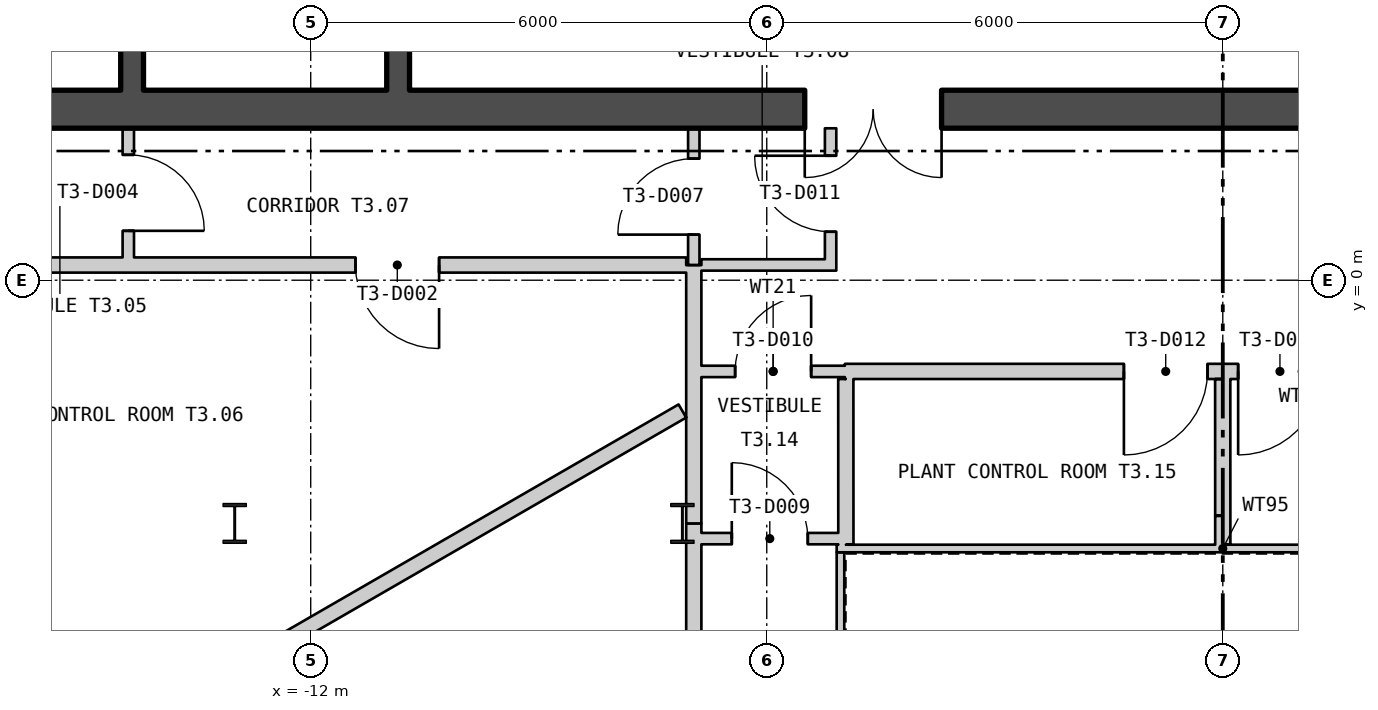
"""IFC4 building model, lengths in metres.
Left out: names, types, materials, properties, quantities, classifications, styles, units other than length and angle.
Written with IfcOpenShell. Run it as: python <this file> out.ifc"""

import sys

from ifc_helpers import new_model, si_unit, direction, frame, frame_2d, origin, origin_2d, place, context, subcontext, project, spatial, polyline, rectangle, i_section, outline, extrude, element, fill, save


model = new_model("IFC4")
c1 = context("Model", 3, precision=1e-05, world=origin(), true_north=direction((0.0, 1.0)))
c2 = subcontext(c1, "Body", "Model", "MODEL_VIEW")
j1 = project(units=[si_unit("LENGTHUNIT", "METRE"), si_unit("PLANEANGLEUNIT", "RADIAN")], contexts=[c1])
p1 = place(None, origin())
s1 = spatial("IfcSite", under=j1, at=p1, CompositionType="ELEMENT")
p2 = place(p1, origin())
s2 = spatial("IfcBuilding", under=s1, at=p2, CompositionType="ELEMENT")
p3 = place(p2, frame((0.0, 0.0, 186.6)))
s3 = spatial("IfcBuildingStorey", under=s2, at=p3, CompositionType="ELEMENT", Elevation=186.6)
for number, where, z_axis, x_axis in (
    (1, (-7.11, -3.2, 0.0), (0.0, 0.0, 1.0), (1.0, 0.0, 0.0)),
    (2, (-13.0, -3.2, 0.0), (0.0, 0.0, 1.0), (1.0, 0.0, 0.0)),
):
    element("IfcColumn", number, at=place(p3, frame(where, z_axis=z_axis, x_axis=x_axis)), inside=s3, PredefinedType="COLUMN", context=c2, shape_type="SweptSolid", body=[
        extrude(i_section(OverallWidth=0.306, OverallDepth=0.524, WebThickness=0.021, FlangeThickness=0.04, at=origin_2d()), origin(), (0.0, 0.0, 1.0), 6.0),
    ])
p4 = place(p3, frame((-26.67, 13.393, -0.18), z_axis=(0.0, 0.0, 1.0), x_axis=(0.500000711659, -0.866024992908, 0.0)))
e3 = element("IfcWall", 3, at=p4, inside=s3, PredefinedType="SOLIDWALL", context=c2, shape_type="SweptSolid", body=[
    extrude(outline(polyline([(-0.13, -0.225), (45.87, -0.225), (45.61, 0.225), (0.13, 0.225), (-0.13, -0.225)])), origin(), (0.0, 0.0, 1.0), 6.0),
])
p5 = place(p4, frame((1.424, 0.0, 1.38)))
e4 = element("IfcOpeningElement", 4, at=p5, cuts=e3, PredefinedType="OPENING", context=c2, shape_type="SweptSolid", body=[
    extrude(rectangle(XDim=2.4, YDim=3.6, at=frame_2d((1.2, 1.8))), frame((0.0, 0.235, 0.0), z_axis=(0.0, -1.0, 0.0), x_axis=(1.0, 0.0, 0.0)), (0.0, 0.0, 1.0), 0.47),
])
p6 = place(p4, frame((5.893, 0.0, 1.38)))
e5 = element("IfcOpeningElement", 5, at=p6, cuts=e3, PredefinedType="OPENING", context=c2, shape_type="SweptSolid", body=[
    extrude(rectangle(XDim=2.4, YDim=3.6, at=frame_2d((1.2, 1.8))), frame((0.0, 0.235, 0.0), z_axis=(0.0, -1.0, 0.0), x_axis=(1.0, 0.0, 0.0)), (0.0, 0.0, 1.0), 0.47),
])
p7 = place(p4, frame((10.401, 0.0, 1.38)))
e6 = element("IfcOpeningElement", 6, at=p7, cuts=e3, PredefinedType="OPENING", context=c2, shape_type="SweptSolid", body=[
    extrude(rectangle(XDim=2.4, YDim=3.6, at=frame_2d((1.2, 1.8))), frame((0.0, 0.235, 0.0), z_axis=(0.0, -1.0, 0.0), x_axis=(1.0, 0.0, 0.0)), (0.0, 0.0, 1.0), 0.47),
])
p8 = place(p4, frame((14.909, 0.0, 1.38)))
e7 = element("IfcOpeningElement", 7, at=p8, cuts=e3, PredefinedType="OPENING", context=c2, shape_type="SweptSolid", body=[
    extrude(rectangle(XDim=2.4, YDim=3.6, at=frame_2d((1.2, 1.8))), frame((0.0, 0.235, 0.0), z_axis=(0.0, -1.0, 0.0), x_axis=(1.0, 0.0, 0.0)), (0.0, 0.0, 1.0), 0.47),
])
p9 = place(p4, frame((19.416, 0.0, 1.38)))
e8 = element("IfcOpeningElement", 8, at=p9, cuts=e3, PredefinedType="OPENING", context=c2, shape_type="SweptSolid", body=[
    extrude(rectangle(XDim=2.4, YDim=3.6, at=frame_2d((1.2, 1.8))), frame((0.0, 0.235, 0.0), z_axis=(0.0, -1.0, 0.0), x_axis=(1.0, 0.0, 0.0)), (0.0, 0.0, 1.0), 0.47),
])
p10 = place(p4, frame((23.924, 0.0, 1.38)))
e9 = element("IfcOpeningElement", 9, at=p10, cuts=e3, PredefinedType="OPENING", context=c2, shape_type="SweptSolid", body=[
    extrude(rectangle(XDim=2.4, YDim=3.6, at=frame_2d((1.2, 1.8))), frame((0.0, 0.235, 0.0), z_axis=(0.0, -1.0, 0.0), x_axis=(1.0, 0.0, 0.0)), (0.0, 0.0, 1.0), 0.47),
])
p11 = place(p4, frame((28.431, 0.0, 1.38)))
e10 = element("IfcOpeningElement", 10, at=p11, cuts=e3, PredefinedType="OPENING", context=c2, shape_type="SweptSolid", body=[
    extrude(rectangle(XDim=2.4, YDim=3.6, at=frame_2d((1.2, 1.8))), frame((0.0, 0.235, 0.0), z_axis=(0.0, -1.0, 0.0), x_axis=(1.0, 0.0, 0.0)), (0.0, 0.0, 1.0), 0.47),
])
p12 = place(p4, frame((32.939, 0.0, 1.38)))
e11 = element("IfcOpeningElement", 11, at=p12, cuts=e3, PredefinedType="OPENING", context=c2, shape_type="SweptSolid", body=[
    extrude(rectangle(XDim=2.4, YDim=3.6, at=frame_2d((1.2, 1.8))), frame((0.0, 0.235, 0.0), z_axis=(0.0, -1.0, 0.0), x_axis=(1.0, 0.0, 0.0)), (0.0, 0.0, 1.0), 0.47),
])
p13 = place(p4, frame((37.447, 0.0, 1.38)))
e12 = element("IfcOpeningElement", 12, at=p13, cuts=e3, PredefinedType="OPENING", context=c2, shape_type="SweptSolid", body=[
    extrude(rectangle(XDim=2.4, YDim=3.6, at=frame_2d((1.2, 1.8))), frame((0.0, 0.235, 0.0), z_axis=(0.0, -1.0, 0.0), x_axis=(1.0, 0.0, 0.0)), (0.0, 0.0, 1.0), 0.47),
])
p14 = place(p4, frame((41.916, 0.0, 1.38)))
e13 = element("IfcOpeningElement", 13, at=p14, cuts=e3, PredefinedType="OPENING", context=c2, shape_type="SweptSolid", body=[
    extrude(rectangle(XDim=2.4, YDim=3.6, at=frame_2d((1.2, 1.8))), frame((0.0, 0.235, 0.0), z_axis=(0.0, -1.0, 0.0), x_axis=(1.0, 0.0, 0.0)), (0.0, 0.0, 1.0), 0.47),
])
p15 = place(p3, frame((5.08, -3.53, 0.0), z_axis=(0.0, 0.0, 1.0), x_axis=(-1.0, 0.0, 0.0)))
e14 = element("IfcWall", 14, at=p15, inside=s3, PredefinedType="PARTITIONING", context=c2, shape_type="SweptSolid", body=[
    extrude(rectangle(XDim=10.16, YDim=0.1, at=frame_2d((5.08, 0.0))), origin(), (0.0, 0.0, 1.0), 5.8),
])
p16 = place(p3, frame((-5.03, -3.58, 0.0), z_axis=(0.0, 0.0, 1.0), x_axis=(0.0, -1.0, 0.0)))
e15 = element("IfcWall", 15, at=p16, inside=s3, PredefinedType="PARTITIONING", context=c2, shape_type="SweptSolid", body=[
    extrude(rectangle(XDim=8.04, YDim=0.1, at=frame_2d((4.02, 0.0))), origin(), (0.0, 0.0, 1.0), 5.8),
])
p17 = place(p3, frame((-16.2, 2.25, 0.0), z_axis=(0.0, 0.0, 1.0), x_axis=(1.0, 0.0, 0.0)))
e16 = element("IfcWall", 16, at=p17, inside=s3, PredefinedType="SHEAR", context=c2, shape_type="SweptSolid", body=[
    extrude(rectangle(XDim=32.4, YDim=0.5, at=frame_2d((16.2, 0.0))), origin(), (0.0, 0.0, 1.0), 5.8),
])
p18 = place(p17, frame((10.7, 0.0, 0.0)))
e17 = element("IfcOpeningElement", 17, at=p18, cuts=e16, PredefinedType="OPENING", context=c2, shape_type="SweptSolid", body=[
    extrude(rectangle(XDim=1.8, YDim=2.4, at=frame_2d((0.9, 1.2))), frame((0.0, 0.26, 0.0), z_axis=(0.0, -1.0, 0.0), x_axis=(1.0, 0.0, 0.0)), (0.0, 0.0, 1.0), 0.52),
])
p19 = place(p17, frame((20.7, 0.0, 0.0)))
e18 = element("IfcOpeningElement", 18, at=p19, cuts=e16, PredefinedType="OPENING", context=c2, shape_type="SweptSolid", body=[
    extrude(rectangle(XDim=1.8, YDim=2.4, at=frame_2d((0.9, 1.2))), frame((0.0, 0.26, 0.0), z_axis=(0.0, -1.0, 0.0), x_axis=(1.0, 0.0, 0.0)), (0.0, 0.0, 1.0), 0.52),
])
p20 = place(p3, frame((-10.85, 2.5, 0.0), z_axis=(0.0, 0.0, 1.0), x_axis=(0.0, 1.0, 0.0)))
e19 = element("IfcWall", 19, at=p20, inside=s3, PredefinedType="SHEAR", context=c2, shape_type="SweptSolid", body=[
    extrude(rectangle(XDim=15.0, YDim=0.3, at=frame_2d((7.5, 0.0))), origin(), (0.0, 0.0, 1.0), 5.8),
])
p21 = place(p20, frame((3.475, 0.0, 0.0)))
e20 = element("IfcOpeningElement", 20, at=p21, cuts=e19, PredefinedType="OPENING", context=c2, shape_type="SweptSolid", body=[
    extrude(rectangle(XDim=1.25, YDim=2.1, at=frame_2d((0.625, 1.05))), frame((0.0, 0.16, 0.0), z_axis=(0.0, -1.0, 0.0), x_axis=(1.0, 0.0, 0.0)), (0.0, 0.0, 1.0), 0.32),
])
p22 = place(p20, frame((1.125, 0.0, 0.0)))
e21 = element("IfcOpeningElement", 21, at=p22, cuts=e19, PredefinedType="OPENING", context=c2, shape_type="SweptSolid", body=[
    extrude(rectangle(XDim=1.0, YDim=2.1, at=frame_2d((0.5, 1.05))), frame((0.0, 0.16, 0.0), z_axis=(0.0, -1.0, 0.0), x_axis=(1.0, 0.0, 0.0)), (0.0, 0.0, 1.0), 0.32),
])
p23 = place(p3, frame((-14.35, 2.5, 0.0), z_axis=(0.0, 0.0, 1.0), x_axis=(0.0, 1.0, 0.0)))
e22 = element("IfcWall", 22, at=p23, inside=s3, PredefinedType="SHEAR", context=c2, shape_type="SweptSolid", body=[
    extrude(rectangle(XDim=15.0, YDim=0.3, at=frame_2d((7.5, 0.0))), origin(), (0.0, 0.0, 1.0), 5.8),
])
p24 = place(p23, frame((4.35, 0.0, 0.0)))
e23 = element("IfcOpeningElement", 23, at=p24, cuts=e22, PredefinedType="OPENING", context=c2, shape_type="SweptSolid", body=[
    extrude(rectangle(XDim=1.5, YDim=2.1, at=frame_2d((0.75, 1.05))), frame((0.0, 0.16, 0.0), z_axis=(0.0, -1.0, 0.0), x_axis=(1.0, 0.0, 0.0)), (0.0, 0.0, 1.0), 0.32),
])
p25 = place(p3, frame((-17.9, 0.2, 0.0), z_axis=(0.0, 0.0, 1.0), x_axis=(1.0, 0.0, 0.0)))
e24 = element("IfcWall", 24, at=p25, inside=s3, PredefinedType="PARTITIONING", context=c2, shape_type="SweptSolid", body=[
    extrude(rectangle(XDim=10.84, YDim=0.2, at=frame_2d((5.42, 0.0))), origin(), (0.0, 0.0, 1.0), 5.8),
])
p26 = place(p25, frame((6.489, 0.0, 0.0)))
e25 = element("IfcOpeningElement", 25, at=p26, cuts=e24, PredefinedType="OPENING", context=c2, shape_type="SweptSolid", body=[
    extrude(rectangle(XDim=1.1, YDim=2.1, at=frame_2d((0.55, 1.05))), frame((0.0, 0.11, 0.0), z_axis=(0.0, -1.0, 0.0), x_axis=(1.0, 0.0, 0.0)), (0.0, 0.0, 1.0), 0.22),
])
p27 = place(p3, frame((-14.651, -6.075, 0.0), z_axis=(0.0, 0.0, 1.0), x_axis=(0.866015377534, 0.500017365573, 0.0)))
e26 = element("IfcWall", 26, at=p27, inside=s3, PredefinedType="PARTITIONING", context=c2, shape_type="SweptSolid", body=[
    extrude(rectangle(XDim=8.708, YDim=0.2, at=frame_2d((4.354, 0.0))), origin(), (0.0, 0.0, 1.0), 5.8),
])
p28 = place(p3, frame((-14.4, 0.3, 0.0), z_axis=(0.0, 0.0, 1.0), x_axis=(0.0, 1.0, 0.0)))
e27 = element("IfcWall", 27, at=p28, inside=s3, PredefinedType="PARTITIONING", context=c2, shape_type="SweptSolid", body=[
    extrude(rectangle(XDim=1.7, YDim=0.15, at=frame_2d((0.85, 0.0))), origin(), (0.0, 0.0, 1.0), 5.8),
])
p29 = place(p28, frame((0.35, 0.0, 0.0)))
e28 = element("IfcOpeningElement", 28, at=p29, cuts=e27, PredefinedType="OPENING", context=c2, shape_type="SweptSolid", body=[
    extrude(rectangle(XDim=1.0, YDim=2.1, at=frame_2d((0.5, 1.05))), frame((0.0, 0.085, 0.0), z_axis=(0.0, -1.0, 0.0), x_axis=(1.0, 0.0, 0.0)), (0.0, 0.0, 1.0), 0.17),
])
p30 = place(p3, frame((-6.96, -13.699, 0.0), z_axis=(0.0, 0.0, 1.0), x_axis=(0.0, 1.0, 0.0)))
e29 = element("IfcWall", 29, at=p30, inside=s3, PredefinedType="PARTITIONING", context=c2, shape_type="SweptSolid", body=[
    extrude(rectangle(XDim=10.499, YDim=0.2, at=frame_2d((5.25, 0.0))), origin(), (0.0, 0.0, 1.0), 5.21),
])
p31 = place(p30, frame((3.656, 0.0, 0.0)))
e30 = element("IfcOpeningElement", 30, at=p31, cuts=e29, PredefinedType="OPENING", context=c2, shape_type="SweptSolid", body=[
    extrude(rectangle(XDim=1.1, YDim=2.1, at=frame_2d((0.55, 1.05))), frame((0.0, 0.11, 0.0), z_axis=(0.0, -1.0, 0.0), x_axis=(1.0, 0.0, 0.0)), (0.0, 0.0, 1.0), 0.22),
])
p32 = place(p30, frame((7.059, 0.0, 0.0)))
e31 = element("IfcOpeningElement", 31, at=p32, cuts=e29, PredefinedType="OPENING", context=c2, shape_type="SweptSolid", body=[
    extrude(rectangle(XDim=1.1, YDim=2.1, at=frame_2d((0.55, 1.05))), frame((0.0, 0.11, 0.0), z_axis=(0.0, -1.0, 0.0), x_axis=(1.0, 0.0, 0.0)), (0.0, 0.0, 1.0), 0.22),
])
p33 = place(p3, frame((-6.96, -3.2, 0.0), z_axis=(0.0, 0.0, 1.0), x_axis=(0.0, 1.0, 0.0)))
e32 = element("IfcWall", 32, at=p33, inside=s3, PredefinedType="PARTITIONING", context=c2, shape_type="SweptSolid", body=[
    extrude(rectangle(XDim=3.398, YDim=0.2, at=frame_2d((1.699, 0.0))), origin(), (0.0, 0.0, 1.0), 5.8),
])
p34 = place(p3, frame((-6.96, 0.201, 0.0), z_axis=(0.0, 0.0, 1.0), x_axis=(0.0, 1.0, 0.0)))
e33 = element("IfcWall", 33, at=p34, inside=s3, PredefinedType="PARTITIONING", context=c2, shape_type="SweptSolid", body=[
    extrude(rectangle(XDim=1.798, YDim=0.15, at=frame_2d((0.899, 0.0))), origin(), (0.0, 0.0, 1.0), 5.8),
])
p35 = place(p34, frame((0.399, 0.0, 0.0)))
e34 = element("IfcOpeningElement", 34, at=p35, cuts=e33, PredefinedType="OPENING", context=c2, shape_type="SweptSolid", body=[
    extrude(rectangle(XDim=1.0, YDim=2.1, at=frame_2d((0.5, 1.05))), frame((0.0, 0.085, 0.0), z_axis=(0.0, -1.0, 0.0), x_axis=(1.0, 0.0, 0.0)), (0.0, 0.0, 1.0), 0.17),
])
p36 = place(p3, frame((-6.86, -3.4, 0.0), z_axis=(0.0, 0.0, 1.0), x_axis=(1.0, 0.0, 0.0)))
e35 = element("IfcWall", 35, at=p36, inside=s3, PredefinedType="PARTITIONING", context=c2, shape_type="SweptSolid", body=[
    extrude(rectangle(XDim=1.801, YDim=0.15, at=frame_2d((0.9, 0.0))), origin(), (0.0, 0.0, 1.0), 5.8),
])
p37 = place(p36, frame((0.4, 0.0, 0.0)))
e36 = element("IfcOpeningElement", 36, at=p37, cuts=e35, PredefinedType="OPENING", context=c2, shape_type="SweptSolid", body=[
    extrude(rectangle(XDim=1.0, YDim=2.1, at=frame_2d((0.5, 1.05))), frame((0.0, 0.085, 0.0), z_axis=(0.0, -1.0, 0.0), x_axis=(1.0, 0.0, 0.0)), (0.0, 0.0, 1.0), 0.17),
])
p38 = place(p3, frame((-6.86, -1.2, 0.0), z_axis=(0.0, 0.0, 1.0), x_axis=(1.0, 0.0, 0.0)))
e37 = element("IfcWall", 37, at=p38, inside=s3, PredefinedType="PARTITIONING", context=c2, shape_type="SweptSolid", body=[
    extrude(rectangle(XDim=1.888, YDim=0.15, at=frame_2d((0.944, 0.0))), origin(), (0.0, 0.0, 1.0), 5.8),
])
p39 = place(p38, frame((0.444, 0.0, 0.0)))
e38 = element("IfcOpeningElement", 38, at=p39, cuts=e37, PredefinedType="OPENING", context=c2, shape_type="SweptSolid", body=[
    extrude(rectangle(XDim=1.0, YDim=2.1, at=frame_2d((0.5, 1.05))), frame((0.0, 0.085, 0.0), z_axis=(0.0, -1.0, 0.0), x_axis=(1.0, 0.0, 0.0)), (0.0, 0.0, 1.0), 0.17),
])
p40 = place(p3, frame((-6.86, 0.201, 0.0), z_axis=(0.0, 0.0, 1.0), x_axis=(1.0, 0.0, 0.0)))
e39 = element("IfcWall", 39, at=p40, inside=s3, PredefinedType="PARTITIONING", context=c2, shape_type="SweptSolid", body=[
    extrude(rectangle(XDim=1.775, YDim=0.15, at=frame_2d((0.887, 0.0))), origin(), (0.0, 0.0, 1.0), 5.8),
])
p41 = place(p3, frame((-5.16, 0.276, 0.0), z_axis=(0.0, 0.0, 1.0), x_axis=(0.0, 1.0, 0.0)))
e40 = element("IfcWall", 40, at=p41, inside=s3, PredefinedType="PARTITIONING", context=c2, shape_type="SweptSolid", body=[
    extrude(rectangle(XDim=1.723, YDim=0.15, at=frame_2d((0.862, 0.0))), origin(), (0.0, 0.0, 1.0), 5.8),
])
p42 = place(p41, frame((0.362, 0.0, 0.0)))
e41 = element("IfcOpeningElement", 41, at=p42, cuts=e40, PredefinedType="OPENING", context=c2, shape_type="SweptSolid", body=[
    extrude(rectangle(XDim=1.0, YDim=2.1, at=frame_2d((0.5, 1.05))), frame((0.0, 0.085, 0.0), z_axis=(0.0, -1.0, 0.0), x_axis=(1.0, 0.0, 0.0)), (0.0, 0.0, 1.0), 0.17),
])
p43 = place(p3, frame((-4.972, -1.2, 0.0), z_axis=(0.0, 0.0, 1.0), x_axis=(1.0, 0.0, 0.0)))
e42 = element("IfcWall", 42, at=p43, inside=s3, PredefinedType="PARTITIONING", context=c2, shape_type="SweptSolid", body=[
    extrude(rectangle(XDim=12.032, YDim=0.2, at=frame_2d((6.016, 0.0))), origin(), (0.0, 0.0, 1.0), 5.8),
])
p44 = place(p43, frame((3.671, 0.0, 0.0)))
e43 = element("IfcOpeningElement", 43, at=p44, cuts=e42, PredefinedType="OPENING", context=c2, shape_type="SweptSolid", body=[
    extrude(rectangle(XDim=1.1, YDim=2.1, at=frame_2d((0.55, 1.05))), frame((0.0, 0.11, 0.0), z_axis=(0.0, -1.0, 0.0), x_axis=(1.0, 0.0, 0.0)), (0.0, 0.0, 1.0), 0.22),
])
p45 = place(p43, frame((5.174, 0.0, 0.0)))
e44 = element("IfcOpeningElement", 44, at=p45, cuts=e42, PredefinedType="OPENING", context=c2, shape_type="SweptSolid", body=[
    extrude(rectangle(XDim=1.1, YDim=2.1, at=frame_2d((0.55, 1.05))), frame((0.0, 0.11, 0.0), z_axis=(0.0, -1.0, 0.0), x_axis=(1.0, 0.0, 0.0)), (0.0, 0.0, 1.0), 0.22),
])
p46 = place(p3, frame((-4.959, -3.48, 0.0), z_axis=(0.0, 0.0, 1.0), x_axis=(-0.000458715548, 0.99999989479, 0.0)))
e45 = element("IfcWall", 45, at=p46, inside=s3, PredefinedType="PARTITIONING", context=c2, shape_type="SweptSolid", body=[
    extrude(rectangle(XDim=2.18, YDim=0.2, at=frame_2d((1.09, 0.0))), origin(), (0.0, 0.0, 1.0), 5.8),
])
p47 = place(p3, frame((-0.001, -1.3, 0.0), z_axis=(0.0, 0.0, 1.0), x_axis=(0.000444444401, -0.999999901235, 0.0)))
e46 = element("IfcWall", 46, at=p47, inside=s3, PredefinedType="PARTITIONING", context=c2, shape_type="SweptSolid", body=[
    extrude(rectangle(XDim=1.8, YDim=0.2, at=frame_2d((0.9, 0.0))), origin(), (0.0, 0.0, 1.0), 5.25),
])
p48 = place(p3, frame((-0.0, -3.1, 0.0), z_axis=(0.0, 0.0, 1.0), x_axis=(0.000526315717, -0.999999861496, 0.0)))
e47 = element("IfcWall", 47, at=p48, inside=s3, PredefinedType="PARTITIONING", context=c2, shape_type="SweptSolid", body=[
    extrude(rectangle(XDim=0.38, YDim=0.2, at=frame_2d((0.19, 0.0))), origin(), (0.0, 0.0, 1.0), 5.8),
])
p49 = place(p18, origin())
e48 = element("IfcDoor", 48, at=p49, inside=s3, OperationType="DOUBLE_DOOR_SINGLE_SWING", PredefinedType="DOOR", context=c2, shape_type="SweptSolid", body=[
    extrude(rectangle(XDim=1.8, YDim=2.4, at=frame_2d((0.9, 1.2))), frame((0.0, 0.025, 0.0), z_axis=(0.0, -1.0, 0.0), x_axis=(1.0, 0.0, 0.0)), (0.0, 0.0, 1.0), 0.05),
])
fill(e17, e48)
p50 = place(p26, origin())
e49 = element("IfcDoor", 49, at=p50, inside=s3, OperationType="SINGLE_SWING_RIGHT", PredefinedType="DOOR", context=c2, shape_type="SweptSolid", body=[
    extrude(rectangle(XDim=1.1, YDim=2.1, at=frame_2d((0.55, 1.05))), frame((0.0, 0.025, 0.0), z_axis=(0.0, -1.0, 0.0), x_axis=(1.0, 0.0, 0.0)), (0.0, 0.0, 1.0), 0.05),
])
fill(e25, e49)
p51 = place(p29, origin())
e50 = element("IfcDoor", 50, at=p51, inside=s3, OperationType="SINGLE_SWING_LEFT", PredefinedType="DOOR", context=c2, shape_type="SweptSolid", body=[
    extrude(rectangle(XDim=1.0, YDim=2.1, at=frame_2d((0.5, 1.05))), frame((0.0, 0.025, 0.0), z_axis=(0.0, -1.0, 0.0), x_axis=(1.0, 0.0, 0.0)), (0.0, 0.0, 1.0), 0.05),
])
fill(e28, e50)
p52 = place(p35, origin())
e51 = element("IfcDoor", 51, at=p52, inside=s3, OperationType="SINGLE_SWING_RIGHT", PredefinedType="DOOR", context=c2, shape_type="SweptSolid", body=[
    extrude(rectangle(XDim=1.0, YDim=2.1, at=frame_2d((0.5, 1.05))), frame((0.0, 0.025, 0.0), z_axis=(0.0, -1.0, 0.0), x_axis=(1.0, 0.0, 0.0)), (0.0, 0.0, 1.0), 0.05),
])
fill(e34, e51)
p53 = place(p37, origin())
e52 = element("IfcDoor", 52, at=p53, inside=s3, OperationType="SINGLE_SWING_RIGHT", PredefinedType="DOOR", context=c2, shape_type="SweptSolid", body=[
    extrude(rectangle(XDim=1.0, YDim=2.1, at=frame_2d((0.5, 1.05))), frame((0.0, 0.025, 0.0), z_axis=(0.0, -1.0, 0.0), x_axis=(1.0, 0.0, 0.0)), (0.0, 0.0, 1.0), 0.05),
])
fill(e36, e52)
p54 = place(p39, origin())
e53 = element("IfcDoor", 53, at=p54, inside=s3, OperationType="SINGLE_SWING_LEFT", PredefinedType="DOOR", context=c2, shape_type="SweptSolid", body=[
    extrude(rectangle(XDim=1.0, YDim=2.1, at=frame_2d((0.5, 1.05))), frame((0.0, 0.025, 0.0), z_axis=(0.0, -1.0, 0.0), x_axis=(1.0, 0.0, 0.0)), (0.0, 0.0, 1.0), 0.05),
])
fill(e38, e53)
p55 = place(p42, origin())
e54 = element("IfcDoor", 54, at=p55, inside=s3, OperationType="SINGLE_SWING_LEFT", PredefinedType="DOOR", context=c2, shape_type="SweptSolid", body=[
    extrude(rectangle(XDim=1.0, YDim=2.1, at=frame_2d((0.5, 1.05))), frame((0.0, 0.025, 0.0), z_axis=(0.0, -1.0, 0.0), x_axis=(1.0, 0.0, 0.0)), (0.0, 0.0, 1.0), 0.05),
])
fill(e41, e54)
p56 = place(p44, origin())
e55 = element("IfcDoor", 55, at=p56, inside=s3, OperationType="SINGLE_SWING_LEFT", PredefinedType="DOOR", context=c2, shape_type="SweptSolid", body=[
    extrude(rectangle(XDim=1.1, YDim=2.1, at=frame_2d((0.55, 1.05))), frame((0.0, 0.025, 0.0), z_axis=(0.0, -1.0, 0.0), x_axis=(1.0, 0.0, 0.0)), (0.0, 0.0, 1.0), 0.05),
])
fill(e43, e55)
p57 = place(p45, origin())
e56 = element("IfcDoor", 56, at=p57, inside=s3, OperationType="SINGLE_SWING_LEFT", PredefinedType="DOOR", context=c2, shape_type="SweptSolid", body=[
    extrude(rectangle(XDim=1.1, YDim=2.1, at=frame_2d((0.55, 1.05))), frame((0.0, 0.025, 0.0), z_axis=(0.0, -1.0, 0.0), x_axis=(1.0, 0.0, 0.0)), (0.0, 0.0, 1.0), 0.05),
])
fill(e44, e56)
save(model, sys.argv[1])
